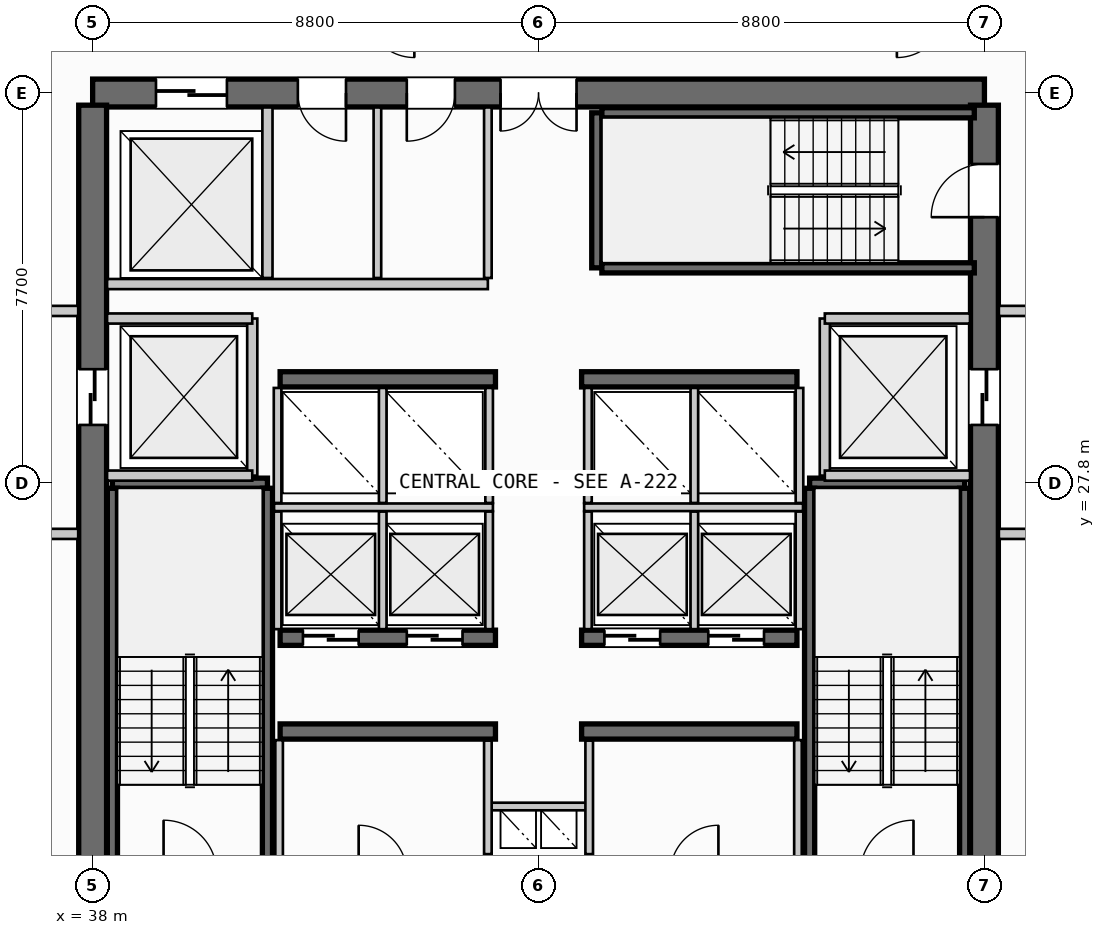
"""IFC4 building model, lengths in metres.
Left out: names, types, materials, properties, quantities, classifications, styles, units other than length and angle.
Written with IfcOpenShell. Run it as: python <this file> out.ifc"""

import sys

from ifc_helpers import new_model, si_unit, direction, frame, frame_2d, origin, place, context, subcontext, project, spatial, rectangle, extrude, source, transform, mapped, element, fill, save


model = new_model("IFC4")
c1 = context("Model", 3, precision=1e-05, world=origin(), true_north=direction((0.0, 1.0)))
c2 = subcontext(c1, "Body", "Model", "MODEL_VIEW")
j1 = project(units=[si_unit("LENGTHUNIT", "METRE"), si_unit("PLANEANGLEUNIT", "RADIAN")], contexts=[c1])
p1 = place(None, origin())
s1 = spatial("IfcSite", under=j1, at=p1, CompositionType="ELEMENT")
p2 = place(p1, origin())
s2 = spatial("IfcBuilding", under=s1, at=p2, CompositionType="ELEMENT")
p3 = place(p2, frame((0.0, 0.0, 157.2)))
s3 = spatial("IfcBuildingStorey", under=s2, at=p3, CompositionType="ELEMENT", Elevation=157.2)
p4 = place(p3, frame((55.6, 35.5, 0.0), z_axis=(0.0, 0.0, 1.0), x_axis=(-1.0, 0.0, 0.0)))
e1 = element("IfcWall", 1, at=p4, inside=s3, PredefinedType="SHEAR", context=c2, shape_type="SweptSolid", body=[
    extrude(rectangle(XDim=17.6, YDim=0.55, at=frame_2d((8.8, 0.0))), origin(), (0.0, 0.0, 1.0), 3.3),
])
p5 = place(p4, frame((8.05, 0.0, 0.0)))
e2 = element("IfcOpeningElement", 2, at=p5, cuts=e1, PredefinedType="OPENING", context=c2, shape_type="SweptSolid", body=[
    extrude(rectangle(XDim=1.5, YDim=2.2, at=frame_2d((0.75, 1.1))), frame((0.0, 0.285, 0.0), z_axis=(0.0, -1.0, 0.0), x_axis=(1.0, 0.0, 0.0)), (0.0, 0.0, 1.0), 0.57),
])
p6 = place(p4, frame((14.95, 0.0, 0.0)))
e3 = element("IfcOpeningElement", 3, at=p6, cuts=e1, PredefinedType="OPENING", context=c2, shape_type="SweptSolid", body=[
    extrude(rectangle(XDim=1.4, YDim=2.3, at=frame_2d((0.7, 1.15))), frame((0.0, 0.285, 0.0), z_axis=(0.0, -1.0, 0.0), x_axis=(1.0, 0.0, 0.0)), (0.0, 0.0, 1.0), 0.57),
])
p7 = place(p4, frame((12.6, 0.0, 0.0)))
e4 = element("IfcOpeningElement", 4, at=p7, cuts=e1, PredefinedType="OPENING", context=c2, shape_type="SweptSolid", body=[
    extrude(rectangle(XDim=0.95, YDim=2.15, at=frame_2d((0.475, 1.075))), frame((0.0, 0.285, 0.0), z_axis=(0.0, -1.0, 0.0), x_axis=(1.0, 0.0, 0.0)), (0.0, 0.0, 1.0), 0.57),
])
p8 = place(p4, frame((10.45, 0.0, 0.0)))
e5 = element("IfcOpeningElement", 5, at=p8, cuts=e1, PredefinedType="OPENING", context=c2, shape_type="SweptSolid", body=[
    extrude(rectangle(XDim=0.95, YDim=2.15, at=frame_2d((0.475, 1.075))), frame((0.0, 0.285, 0.0), z_axis=(0.0, -1.0, 0.0), x_axis=(1.0, 0.0, 0.0)), (0.0, 0.0, 1.0), 0.57),
])
p9 = place(p3, frame((38.0, 35.26, 0.0), z_axis=(0.0, 0.0, 1.0), x_axis=(0.0, -1.0, 0.0)))
e6 = element("IfcWall", 6, at=p9, inside=s3, PredefinedType="SHEAR", context=c2, shape_type="SweptSolid", body=[
    extrude(rectangle(XDim=14.92, YDim=0.55, at=frame_2d((7.46, 0.0))), origin(), (0.0, 0.0, 1.0), 3.3),
])
p10 = place(p9, frame((5.21, 0.0, 0.0)))
e7 = element("IfcOpeningElement", 7, at=p10, cuts=e6, PredefinedType="OPENING", context=c2, shape_type="SweptSolid", body=[
    extrude(rectangle(XDim=1.1, YDim=2.2, at=frame_2d((0.55, 1.1))), frame((0.0, 0.285, 0.0), z_axis=(0.0, -1.0, 0.0), x_axis=(1.0, 0.0, 0.0)), (0.0, 0.0, 1.0), 0.57),
])
p11 = place(p3, frame((55.6, 20.34, 0.0), z_axis=(0.0, 0.0, 1.0), x_axis=(0.0, 1.0, 0.0)))
e8 = element("IfcWall", 8, at=p11, inside=s3, PredefinedType="SHEAR", context=c2, shape_type="SweptSolid", body=[
    extrude(rectangle(XDim=14.92, YDim=0.55, at=frame_2d((7.46, 0.0))), origin(), (0.0, 0.0, 1.0), 3.3),
])
p12 = place(p11, frame((12.71, 0.0, 0.0)))
e9 = element("IfcOpeningElement", 9, at=p12, cuts=e8, PredefinedType="OPENING", context=c2, shape_type="SweptSolid", body=[
    extrude(rectangle(XDim=1.05, YDim=2.15, at=frame_2d((0.525, 1.075))), frame((0.0, 0.285, 0.0), z_axis=(0.0, -1.0, 0.0), x_axis=(1.0, 0.0, 0.0)), (0.0, 0.0, 1.0), 0.57),
])
p13 = place(p11, frame((8.61, 0.0, 0.0)))
e10 = element("IfcOpeningElement", 10, at=p13, cuts=e8, PredefinedType="OPENING", context=c2, shape_type="SweptSolid", body=[
    extrude(rectangle(XDim=1.1, YDim=2.2, at=frame_2d((0.55, 1.1))), frame((0.0, 0.285, 0.0), z_axis=(0.0, -1.0, 0.0), x_axis=(1.0, 0.0, 0.0)), (0.0, 0.0, 1.0), 0.57),
])
for number, where, z_axis, x_axis in (
    (11, (41.7, 22.9, 0.0), (0.0, 0.0, 1.0), (1.0, 0.0, 0.0)),
    (12, (47.65, 22.9, 0.0), (0.0, 0.0, 1.0), (1.0, 0.0, 0.0)),
):
    element("IfcWall", number, at=place(p3, frame(where, z_axis=z_axis, x_axis=x_axis)), inside=s3, PredefinedType="SHEAR", context=c2, shape_type="SweptSolid", body=[
        extrude(rectangle(XDim=4.25, YDim=0.3, at=frame_2d((2.125, 0.0))), origin(), (0.0, 0.0, 1.0), 3.3),
    ])
p14 = place(p3, frame((41.7, 24.75, 0.0), z_axis=(0.0, 0.0, 1.0), x_axis=(1.0, 0.0, 0.0)))
e13 = element("IfcWall", 13, at=p14, inside=s3, PredefinedType="SHEAR", context=c2, shape_type="SweptSolid", body=[
    extrude(rectangle(XDim=4.25, YDim=0.3, at=frame_2d((2.125, 0.0))), origin(), (0.0, 0.0, 1.0), 3.3),
])
p15 = place(p14, frame((0.45, 0.0, 0.0)))
e14 = element("IfcOpeningElement", 14, at=p15, cuts=e13, PredefinedType="OPENING", context=c2, shape_type="SweptSolid", body=[
    extrude(rectangle(XDim=1.1, YDim=2.2, at=frame_2d((0.55, 1.1))), frame((0.0, 0.16, 0.0), z_axis=(0.0, -1.0, 0.0), x_axis=(1.0, 0.0, 0.0)), (0.0, 0.0, 1.0), 0.32),
])
p16 = place(p14, frame((2.5, 0.0, 0.0)))
e15 = element("IfcOpeningElement", 15, at=p16, cuts=e13, PredefinedType="OPENING", context=c2, shape_type="SweptSolid", body=[
    extrude(rectangle(XDim=1.1, YDim=2.2, at=frame_2d((0.55, 1.1))), frame((0.0, 0.16, 0.0), z_axis=(0.0, -1.0, 0.0), x_axis=(1.0, 0.0, 0.0)), (0.0, 0.0, 1.0), 0.32),
])
p17 = place(p3, frame((47.65, 24.75, 0.0), z_axis=(0.0, 0.0, 1.0), x_axis=(1.0, 0.0, 0.0)))
e16 = element("IfcWall", 16, at=p17, inside=s3, PredefinedType="SHEAR", context=c2, shape_type="SweptSolid", body=[
    extrude(rectangle(XDim=4.25, YDim=0.3, at=frame_2d((2.125, 0.0))), origin(), (0.0, 0.0, 1.0), 3.3),
])
p18 = place(p17, frame((0.45, 0.0, 0.0)))
e17 = element("IfcOpeningElement", 17, at=p18, cuts=e16, PredefinedType="OPENING", context=c2, shape_type="SweptSolid", body=[
    extrude(rectangle(XDim=1.1, YDim=2.2, at=frame_2d((0.55, 1.1))), frame((0.0, 0.16, 0.0), z_axis=(0.0, -1.0, 0.0), x_axis=(1.0, 0.0, 0.0)), (0.0, 0.0, 1.0), 0.32),
])
p19 = place(p17, frame((2.5, 0.0, 0.0)))
e18 = element("IfcOpeningElement", 18, at=p19, cuts=e16, PredefinedType="OPENING", context=c2, shape_type="SweptSolid", body=[
    extrude(rectangle(XDim=1.1, YDim=2.2, at=frame_2d((0.55, 1.1))), frame((0.0, 0.16, 0.0), z_axis=(0.0, -1.0, 0.0), x_axis=(1.0, 0.0, 0.0)), (0.0, 0.0, 1.0), 0.32),
])
for number, where, z_axis, x_axis in (
    (19, (41.7, 29.85, 0.0), (0.0, 0.0, 1.0), (1.0, 0.0, 0.0)),
    (20, (47.65, 29.85, 0.0), (0.0, 0.0, 1.0), (1.0, 0.0, 0.0)),
):
    element("IfcWall", number, at=place(p3, frame(where, z_axis=z_axis, x_axis=x_axis)), inside=s3, PredefinedType="SHEAR", context=c2, shape_type="SweptSolid", body=[
        extrude(rectangle(XDim=4.25, YDim=0.3, at=frame_2d((2.125, 0.0))), origin(), (0.0, 0.0, 1.0), 3.3),
    ])
p20 = place(p3, frame((38.39, 27.8, 0.0), z_axis=(0.0, 0.0, 1.0), x_axis=(1.0, 0.0, 0.0)))
e21 = element("IfcWall", 21, at=p20, inside=s3, PredefinedType="SHEAR", context=c2, shape_type="SweptSolid", body=[
    extrude(rectangle(XDim=3.06, YDim=0.2, at=frame_2d((1.53, 0.0))), origin(), (0.0, 0.0, 1.0), 3.3),
])
for number, where, z_axis, x_axis in (
    (22, (41.45, 27.7, 0.0), (0.0, 0.0, 1.0), (0.0, -1.0, 0.0)),
    (23, (38.39, 20.35, 0.0), (0.0, 0.0, 1.0), (0.0, 1.0, 0.0)),
):
    element("IfcWall", number, at=place(p3, frame(where, z_axis=z_axis, x_axis=x_axis)), inside=s3, PredefinedType="SHEAR", context=c2, shape_type="SweptSolid", body=[
        extrude(rectangle(XDim=7.35, YDim=0.2, at=frame_2d((3.675, 0.0))), origin(), (0.0, 0.0, 1.0), 3.3),
    ])
p21 = place(p3, frame((52.15, 27.8, 0.0), z_axis=(0.0, 0.0, 1.0), x_axis=(1.0, 0.0, 0.0)))
e24 = element("IfcWall", 24, at=p21, inside=s3, PredefinedType="SHEAR", context=c2, shape_type="SweptSolid", body=[
    extrude(rectangle(XDim=3.06, YDim=0.2, at=frame_2d((1.53, 0.0))), origin(), (0.0, 0.0, 1.0), 3.3),
])
for number, where, z_axis, x_axis in (
    (25, (55.21, 27.7, 0.0), (0.0, 0.0, 1.0), (0.0, -1.0, 0.0)),
    (26, (52.15, 20.35, 0.0), (0.0, 0.0, 1.0), (0.0, 1.0, 0.0)),
):
    element("IfcWall", number, at=place(p3, frame(where, z_axis=z_axis, x_axis=x_axis)), inside=s3, PredefinedType="SHEAR", context=c2, shape_type="SweptSolid", body=[
        extrude(rectangle(XDim=7.35, YDim=0.2, at=frame_2d((3.675, 0.0))), origin(), (0.0, 0.0, 1.0), 3.3),
    ])
p22 = place(p3, frame((47.95, 32.05, 0.0), z_axis=(0.0, 0.0, 1.0), x_axis=(0.0, 1.0, 0.0)))
e27 = element("IfcWall", 27, at=p22, inside=s3, PredefinedType="SHEAR", context=c2, shape_type="SweptSolid", body=[
    extrude(rectangle(XDim=3.06, YDim=0.2, at=frame_2d((1.53, 0.0))), origin(), (0.0, 0.0, 1.0), 3.3),
])
for number, where, z_axis, x_axis in (
    (28, (48.05, 35.11, 0.0), (0.0, 0.0, 1.0), (1.0, 0.0, 0.0)),
    (29, (55.4, 32.05, 0.0), (0.0, 0.0, 1.0), (-1.0, 0.0, 0.0)),
):
    element("IfcWall", number, at=place(p3, frame(where, z_axis=z_axis, x_axis=x_axis)), inside=s3, PredefinedType="SHEAR", context=c2, shape_type="SweptSolid", body=[
        extrude(rectangle(XDim=7.35, YDim=0.2, at=frame_2d((3.675, 0.0))), origin(), (0.0, 0.0, 1.0), 3.3),
    ])
p23 = place(p3, frame((45.8, 21.42, 0.0), z_axis=(0.0, 0.0, 1.0), x_axis=(1.0, 0.0, 0.0)))
e30 = element("IfcWall", 30, at=p23, inside=s3, PredefinedType="PARTITIONING", context=c2, shape_type="SweptSolid", body=[
    extrude(rectangle(XDim=2.0, YDim=0.15, at=frame_2d((1.0, 0.0))), origin(), (0.0, 0.0, 1.0), 2.28),
])
for number, where, z_axis, x_axis in (
    (31, (45.8, 20.48, 0.0), (0.0, 0.0, 1.0), (0.0, 1.0, 0.0)),
    (32, (47.8, 20.48, 0.0), (0.0, 0.0, 1.0), (0.0, 1.0, 0.0)),
):
    element("IfcWall", number, at=place(p3, frame(where, z_axis=z_axis, x_axis=x_axis)), inside=s3, PredefinedType="PARTITIONING", context=c2, shape_type="SweptSolid", body=[
        extrude(rectangle(XDim=2.24, YDim=0.15, at=frame_2d((1.12, 0.0))), origin(), (0.0, 0.0, 1.0), 2.28),
    ])
p24 = place(p3, frame((41.15, 27.95, 0.0), z_axis=(0.0, 0.0, 1.0), x_axis=(0.0, 1.0, 0.0)))
e33 = element("IfcWall", 33, at=p24, inside=s3, PredefinedType="PARTITIONING", context=c2, shape_type="SweptSolid", body=[
    extrude(rectangle(XDim=3.1, YDim=0.2, at=frame_2d((1.55, 0.0))), origin(), (0.0, 0.0, 1.0), 2.28),
])
for number, where, z_axis, x_axis in (
    (34, (38.285, 27.95, 0.0), (0.0, 0.0, 1.0), (1.0, 0.0, 0.0)),
    (35, (38.285, 31.05, 0.0), (0.0, 0.0, 1.0), (1.0, 0.0, 0.0)),
):
    element("IfcWall", number, at=place(p3, frame(where, z_axis=z_axis, x_axis=x_axis)), inside=s3, PredefinedType="PARTITIONING", context=c2, shape_type="SweptSolid", body=[
        extrude(rectangle(XDim=2.865, YDim=0.2, at=frame_2d((1.433, 0.0))), origin(), (0.0, 0.0, 1.0), 2.28),
    ])
for number, where, z_axis, x_axis in (
    (36, (34.5, 26.8, 0.0), (0.0, 0.0, 1.0), (1.0, 0.0, 0.0)),
    (37, (34.5, 31.2, 0.0), (0.0, 0.0, 1.0), (1.0, 0.0, 0.0)),
):
    element("IfcWall", number, at=place(p3, frame(where, z_axis=z_axis, x_axis=x_axis)), inside=s3, PredefinedType="PARTITIONING", context=c2, shape_type="SweptSolid", body=[
        extrude(rectangle(XDim=3.215, YDim=0.2, at=frame_2d((1.607, 0.0))), origin(), (0.0, 0.0, 1.0), 2.28),
    ])
p25 = place(p3, frame((52.45, 27.95, 0.0), z_axis=(0.0, 0.0, 1.0), x_axis=(0.0, 1.0, 0.0)))
e38 = element("IfcWall", 38, at=p25, inside=s3, PredefinedType="PARTITIONING", context=c2, shape_type="SweptSolid", body=[
    extrude(rectangle(XDim=3.1, YDim=0.2, at=frame_2d((1.55, 0.0))), origin(), (0.0, 0.0, 1.0), 2.28),
])
for number, where, z_axis, x_axis in (
    (39, (52.45, 27.95, 0.0), (0.0, 0.0, 1.0), (1.0, 0.0, 0.0)),
    (40, (52.45, 31.05, 0.0), (0.0, 0.0, 1.0), (1.0, 0.0, 0.0)),
):
    element("IfcWall", number, at=place(p3, frame(where, z_axis=z_axis, x_axis=x_axis)), inside=s3, PredefinedType="PARTITIONING", context=c2, shape_type="SweptSolid", body=[
        extrude(rectangle(XDim=2.865, YDim=0.2, at=frame_2d((1.433, 0.0))), origin(), (0.0, 0.0, 1.0), 2.28),
    ])
for number, where, z_axis, x_axis in (
    (41, (55.885, 26.8, 0.0), (0.0, 0.0, 1.0), (1.0, 0.0, 0.0)),
    (42, (55.885, 31.2, 0.0), (0.0, 0.0, 1.0), (1.0, 0.0, 0.0)),
):
    element("IfcWall", number, at=place(p3, frame(where, z_axis=z_axis, x_axis=x_axis)), inside=s3, PredefinedType="PARTITIONING", context=c2, shape_type="SweptSolid", body=[
        extrude(rectangle(XDim=3.215, YDim=0.2, at=frame_2d((1.607, 0.0))), origin(), (0.0, 0.0, 1.0), 2.28),
    ])
for number, where, z_axis, x_axis in (
    (43, (41.68, 20.385, 0.0), (0.0, 0.0, 1.0), (0.0, 1.0, 0.0)),
    (44, (51.92, 20.385, 0.0), (0.0, 0.0, 1.0), (0.0, 1.0, 0.0)),
):
    element("IfcWall", number, at=place(p3, frame(where, z_axis=z_axis, x_axis=x_axis)), inside=s3, PredefinedType="PARTITIONING", context=c2, shape_type="SweptSolid", body=[
        extrude(rectangle(XDim=2.345, YDim=0.15, at=frame_2d((1.172, 0.0))), origin(), (0.0, 0.0, 1.0), 2.28),
    ])
p26 = place(p3, frame((41.58, 27.325, 0.0), z_axis=(0.0, 0.0, 1.0), x_axis=(1.0, 0.0, 0.0)))
e45 = element("IfcWall", 45, at=p26, inside=s3, PredefinedType="PARTITIONING", context=c2, shape_type="SweptSolid", body=[
    extrude(rectangle(XDim=4.32, YDim=0.15, at=frame_2d((2.16, 0.0))), origin(), (0.0, 0.0, 1.0), 2.28),
])
p27 = place(p3, frame((47.7, 27.325, 0.0), z_axis=(0.0, 0.0, 1.0), x_axis=(1.0, 0.0, 0.0)))
e46 = element("IfcWall", 46, at=p27, inside=s3, PredefinedType="PARTITIONING", context=c2, shape_type="SweptSolid", body=[
    extrude(rectangle(XDim=4.32, YDim=0.15, at=frame_2d((2.16, 0.0))), origin(), (0.0, 0.0, 1.0), 2.28),
])
for number, where, z_axis, x_axis in (
    (47, (41.65, 24.92, 0.0), (0.0, 0.0, 1.0), (0.0, 1.0, 0.0)),
    (48, (43.725, 24.92, 0.0), (0.0, 0.0, 1.0), (0.0, 1.0, 0.0)),
    (49, (45.825, 24.92, 0.0), (0.0, 0.0, 1.0), (0.0, 1.0, 0.0)),
    (50, (47.775, 24.92, 0.0), (0.0, 0.0, 1.0), (0.0, 1.0, 0.0)),
    (51, (49.875, 24.92, 0.0), (0.0, 0.0, 1.0), (0.0, 1.0, 0.0)),
    (52, (51.95, 24.92, 0.0), (0.0, 0.0, 1.0), (0.0, 1.0, 0.0)),
):
    element("IfcWall", number, at=place(p3, frame(where, z_axis=z_axis, x_axis=x_axis)), inside=s3, PredefinedType="PARTITIONING", context=c2, shape_type="SweptSolid", body=[
        extrude(rectangle(XDim=2.32, YDim=0.15, at=frame_2d((1.16, 0.0))), origin(), (0.0, 0.0, 1.0), 2.28),
    ])
for number, where, z_axis, x_axis in (
    (53, (41.65, 27.41, 0.0), (0.0, 0.0, 1.0), (0.0, 1.0, 0.0)),
    (54, (43.725, 27.41, 0.0), (0.0, 0.0, 1.0), (0.0, 1.0, 0.0)),
    (55, (45.825, 27.41, 0.0), (0.0, 0.0, 1.0), (0.0, 1.0, 0.0)),
    (56, (47.775, 27.41, 0.0), (0.0, 0.0, 1.0), (0.0, 1.0, 0.0)),
    (57, (49.875, 27.41, 0.0), (0.0, 0.0, 1.0), (0.0, 1.0, 0.0)),
    (58, (51.95, 27.41, 0.0), (0.0, 0.0, 1.0), (0.0, 1.0, 0.0)),
):
    element("IfcWall", number, at=place(p3, frame(where, z_axis=z_axis, x_axis=x_axis)), inside=s3, PredefinedType="PARTITIONING", context=c2, shape_type="SweptSolid", body=[
        extrude(rectangle(XDim=2.27, YDim=0.15, at=frame_2d((1.135, 0.0))), origin(), (0.0, 0.0, 1.0), 2.28),
    ])
p28 = place(p3, frame((41.45, 31.85, 0.0), z_axis=(0.0, 0.0, 1.0), x_axis=(0.0, 1.0, 0.0)))
e59 = element("IfcWall", 59, at=p28, inside=s3, PredefinedType="PARTITIONING", context=c2, shape_type="SweptSolid", body=[
    extrude(rectangle(XDim=3.365, YDim=0.2, at=frame_2d((1.683, 0.0))), origin(), (0.0, 0.0, 1.0), 2.28),
])
p29 = place(p3, frame((38.285, 31.73, 0.0), z_axis=(0.0, 0.0, 1.0), x_axis=(1.0, 0.0, 0.0)))
e60 = element("IfcWall", 60, at=p29, inside=s3, PredefinedType="PARTITIONING", context=c2, shape_type="SweptSolid", body=[
    extrude(rectangle(XDim=7.515, YDim=0.2, at=frame_2d((3.758, 0.0))), origin(), (0.0, 0.0, 1.0), 2.28),
])
p30 = place(p3, frame((45.8, 31.85, 0.0), z_axis=(0.0, 0.0, 1.0), x_axis=(0.0, 1.0, 0.0)))
e61 = element("IfcWall", 61, at=p30, inside=s3, PredefinedType="PARTITIONING", context=c2, shape_type="SweptSolid", body=[
    extrude(rectangle(XDim=3.365, YDim=0.15, at=frame_2d((1.683, 0.0))), origin(), (0.0, 0.0, 1.0), 2.28),
])
p31 = place(p3, frame((43.62, 31.85, 0.0), z_axis=(0.0, 0.0, 1.0), x_axis=(0.0, 1.0, 0.0)))
e62 = element("IfcWall", 62, at=p31, inside=s3, PredefinedType="PLUMBINGWALL", context=c2, shape_type="SweptSolid", body=[
    extrude(rectangle(XDim=3.365, YDim=0.15, at=frame_2d((1.683, 0.0))), origin(), (0.0, 0.0, 1.0), 2.28),
])
m1 = source(origin(), c2, "Body", "SweptSolid", [
    extrude(rectangle(XDim=1.05, YDim=2.15, at=frame_2d((0.525, 1.075))), frame((0.0, 0.025, 0.0), z_axis=(0.0, -1.0, 0.0), x_axis=(1.0, 0.0, 0.0)), (0.0, 0.0, 1.0), 0.05),
])
p32 = place(p12, origin())
e63 = element("IfcDoor", 63, at=p32, inside=s3, OperationType="SINGLE_SWING_LEFT", PredefinedType="DOOR", context=c2, shape_type="MappedRepresentation", body=[
    mapped(m1, transform((0.0, 0.0, 0.0), scale=1.0)),
])
fill(e9, e63)
m2 = source(origin(), c2, "Body", "SweptSolid", [
    extrude(rectangle(XDim=1.5, YDim=2.2, at=frame_2d((0.75, 1.1))), frame((0.0, 0.025, 0.0), z_axis=(0.0, -1.0, 0.0), x_axis=(1.0, 0.0, 0.0)), (0.0, 0.0, 1.0), 0.05),
])
p33 = place(p5, origin())
e64 = element("IfcDoor", 64, at=p33, inside=s3, OperationType="DOUBLE_DOOR_SINGLE_SWING", PredefinedType="DOOR", context=c2, shape_type="MappedRepresentation", body=[
    mapped(m2, transform((0.0, 0.0, 0.0), scale=1.0)),
])
fill(e2, e64)
m3 = source(origin(), c2, "Body", "SweptSolid", [
    extrude(rectangle(XDim=1.1, YDim=2.2, at=frame_2d((0.55, 1.1))), frame((0.0, 0.025, 0.0), z_axis=(0.0, -1.0, 0.0), x_axis=(1.0, 0.0, 0.0)), (0.0, 0.0, 1.0), 0.05),
])
p34 = place(p10, origin())
e65 = element("IfcDoor", 65, at=p34, inside=s3, OperationType="SLIDING_TO_LEFT", PredefinedType="DOOR", context=c2, shape_type="MappedRepresentation", body=[
    mapped(m3, transform((0.0, 0.0, 0.0), scale=1.0)),
])
fill(e7, e65)
p35 = place(p13, origin())
e66 = element("IfcDoor", 66, at=p35, inside=s3, OperationType="SLIDING_TO_RIGHT", PredefinedType="DOOR", context=c2, shape_type="MappedRepresentation", body=[
    mapped(m3, transform((0.0, 0.0, 0.0), scale=1.0)),
])
fill(e10, e66)
p36 = place(p15, origin())
e67 = element("IfcDoor", 67, at=p36, inside=s3, OperationType="SLIDING_TO_RIGHT", PredefinedType="DOOR", context=c2, shape_type="MappedRepresentation", body=[
    mapped(m3, transform((0.0, 0.0, 0.0), scale=1.0)),
])
fill(e14, e67)
p37 = place(p16, origin())
e68 = element("IfcDoor", 68, at=p37, inside=s3, OperationType="SLIDING_TO_RIGHT", PredefinedType="DOOR", context=c2, shape_type="MappedRepresentation", body=[
    mapped(m3, transform((0.0, 0.0, 0.0), scale=1.0)),
])
fill(e15, e68)
p38 = place(p18, origin())
e69 = element("IfcDoor", 69, at=p38, inside=s3, OperationType="SLIDING_TO_RIGHT", PredefinedType="DOOR", context=c2, shape_type="MappedRepresentation", body=[
    mapped(m3, transform((0.0, 0.0, 0.0), scale=1.0)),
])
fill(e17, e69)
p39 = place(p19, origin())
e70 = element("IfcDoor", 70, at=p39, inside=s3, OperationType="SLIDING_TO_RIGHT", PredefinedType="DOOR", context=c2, shape_type="MappedRepresentation", body=[
    mapped(m3, transform((0.0, 0.0, 0.0), scale=1.0)),
])
fill(e18, e70)
m4 = source(origin(), c2, "Body", "SweptSolid", [
    extrude(rectangle(XDim=1.4, YDim=2.3, at=frame_2d((0.7, 1.15))), frame((0.0, 0.025, 0.0), z_axis=(0.0, -1.0, 0.0), x_axis=(1.0, 0.0, 0.0)), (0.0, 0.0, 1.0), 0.05),
])
p40 = place(p6, origin())
e71 = element("IfcDoor", 71, at=p40, inside=s3, OperationType="SLIDING_TO_RIGHT", PredefinedType="DOOR", context=c2, shape_type="MappedRepresentation", body=[
    mapped(m4, transform((0.0, 0.0, 0.0), scale=1.0)),
])
fill(e3, e71)
m5 = source(origin(), c2, "Body", "SweptSolid", [
    extrude(rectangle(XDim=0.95, YDim=2.15, at=frame_2d((0.475, 1.075))), frame((0.0, 0.025, 0.0), z_axis=(0.0, -1.0, 0.0), x_axis=(1.0, 0.0, 0.0)), (0.0, 0.0, 1.0), 0.05),
])
p41 = place(p7, origin())
e72 = element("IfcDoor", 72, at=p41, inside=s3, OperationType="SINGLE_SWING_LEFT", PredefinedType="DOOR", context=c2, shape_type="MappedRepresentation", body=[
    mapped(m5, transform((0.0, 0.0, 0.0), scale=1.0)),
])
fill(e4, e72)
p42 = place(p8, origin())
e73 = element("IfcDoor", 73, at=p42, inside=s3, OperationType="SINGLE_SWING_RIGHT", PredefinedType="DOOR", context=c2, shape_type="MappedRepresentation", body=[
    mapped(m5, transform((0.0, 0.0, 0.0), scale=1.0)),
])
fill(e5, e73)
save(model, sys.argv[1])
